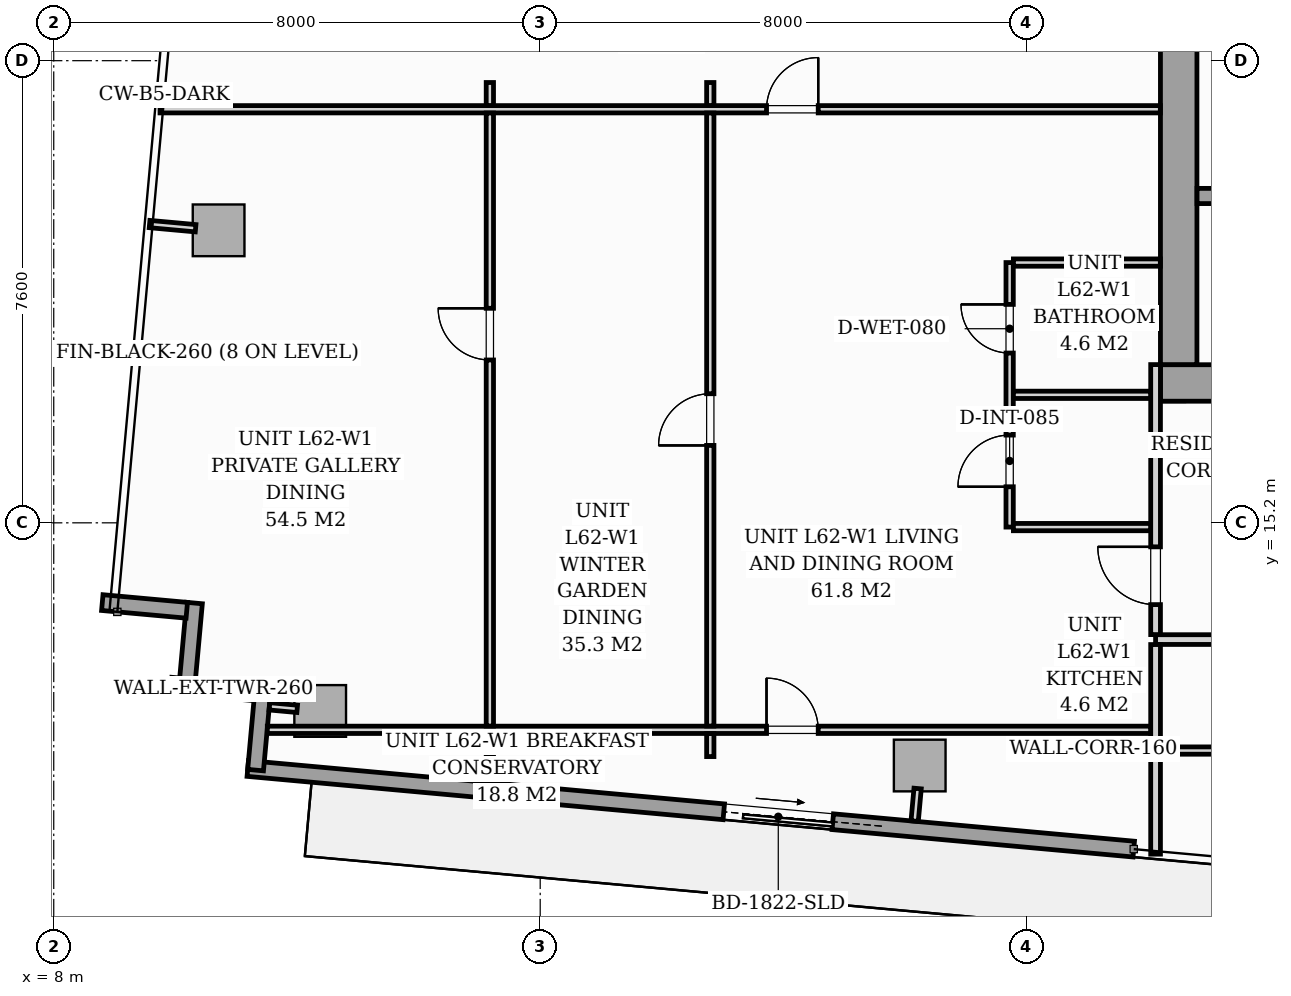
"""IFC4 building model, lengths in metres.
Left out: names, types, materials, properties, quantities, classifications, styles, units other than length and angle.
Written with IfcOpenShell. Run it as: python <this file> out.ifc"""

import sys

from ifc_helpers import new_model, si_unit, direction, frame, frame_2d, origin, origin_2d, place, context, subcontext, project, spatial, rectangle, i_section, extrude, source, transform, mapped, element, fill, save


model = new_model("IFC4")
c1 = context("Model", 3, precision=1e-05, world=origin(), true_north=direction((0.0, 1.0)))
c2 = subcontext(c1, "Body", "Model", "MODEL_VIEW")
j1 = project(units=[si_unit("LENGTHUNIT", "METRE"), si_unit("PLANEANGLEUNIT", "RADIAN")], contexts=[c1])
p1 = place(None, origin())
s1 = spatial("IfcSite", under=j1, at=p1, CompositionType="ELEMENT")
p2 = place(p1, origin())
s2 = spatial("IfcBuilding", under=s1, at=p2, CompositionType="ELEMENT")
p3 = place(p2, frame((0.0, 0.0, 216.6)))
s3 = spatial("IfcBuildingStorey", under=s2, at=p3, CompositionType="ELEMENT", Elevation=216.6)
m1 = source(origin(), c2, "Body", "SweptSolid", [
    extrude(i_section(OverallWidth=0.409, OverallDepth=0.425, WebThickness=0.033, FlangeThickness=0.052, FilletRadius=0.018, at=origin_2d()), origin(), (0.0, 0.0, 1.0), 3.296),
])
p4 = place(p3, frame((26.4, 17.4, 0.002), z_axis=(0.0, 0.0, 1.0), x_axis=(1.0, 0.0, 0.0)))
e1 = element("IfcColumn", 1, at=p4, inside=s3, PredefinedType="PILASTER", context=c2, shape_type="MappedRepresentation", body=[
    mapped(m1, transform((0.0, 0.0, 0.0), scale=1.0)),
])
m2 = source(origin(), c2, "Body", "SweptSolid", [
    extrude(rectangle(XDim=0.85, YDim=0.85, at=origin_2d()), origin(), (0.0, 0.0, 1.0), 3.294),
])
for number, where, z_axis, x_axis in (
    (2, (12.382, 12.106, 0.004), (0.0, 0.0, 1.0), (0.996, -0.091, 0.0)),
    (3, (22.241, 11.209, 0.004), (0.0, 0.0, 1.0), (0.996, -0.091, 0.0)),
    (4, (10.711, 20.01, 0.004), (0.0, 0.0, 1.0), (0.996, -0.091, 0.0)),
):
    element("IfcColumn", number, at=place(p3, frame(where, z_axis=z_axis, x_axis=x_axis)), inside=s3, PredefinedType="COLUMN", context=c2, shape_type="MappedRepresentation", body=[
        mapped(m2, transform((0.0, 0.0, 0.0), scale=1.0)),
    ])
p5 = place(p3, frame((11.319, 12.404, 0.0), z_axis=(0.0, 0.0, 1.0), x_axis=(-0.995881721538, 0.090661991521, 0.0)))
e5 = element("IfcWall", 5, at=p5, inside=s3, PredefinedType="STANDARD", context=c2, shape_type="SweptSolid", body=[
    extrude(rectangle(XDim=1.395, YDim=0.26, at=frame_2d((0.698, 0.0))), origin(), (0.0, 0.0, 1.0), 3.04),
])
p6 = place(p3, frame((10.188, 12.492, 0.0), z_axis=(0.0, 0.0, 1.0), x_axis=(0.090646191665, 0.995883159782, 0.0)))
e6 = element("IfcWall", 6, at=p6, inside=s3, PredefinedType="STANDARD", context=c2, shape_type="SweptSolid", body=[
    extrude(rectangle(XDim=1.395, YDim=0.26, at=frame_2d((0.698, 0.0))), origin(), (0.0, 0.0, 1.0), 3.04),
])
p7 = place(p3, frame((10.188, 13.762, 0.0), z_axis=(0.0, 0.0, 1.0), x_axis=(-0.995881721538, 0.090661991521, 0.0)))
e7 = element("IfcWall", 7, at=p7, inside=s3, PredefinedType="STANDARD", context=c2, shape_type="SweptSolid", body=[
    extrude(rectangle(XDim=1.395, YDim=0.26, at=frame_2d((0.698, 0.0))), origin(), (0.0, 0.0, 1.0), 3.04),
])
p8 = place(p3, frame((25.761, 9.834, 0.0), z_axis=(0.0, 0.0, 1.0), x_axis=(-0.995884584572, 0.090630536861, 0.0)))
e8 = element("IfcWall", 8, at=p8, inside=s3, PredefinedType="STANDARD", context=c2, shape_type="SweptSolid", body=[
    extrude(rectangle(XDim=14.63, YDim=0.26, at=frame_2d((7.315, 0.0))), origin(), (0.0, 0.0, 1.0), 3.04),
])
p9 = place(p8, frame((4.97, 0.0, 0.0)))
e9 = element("IfcOpeningElement", 9, at=p9, cuts=e8, PredefinedType="OPENING", context=c2, shape_type="SweptSolid", body=[
    extrude(rectangle(XDim=1.8, YDim=2.06, at=frame_2d((0.9, 1.03))), frame((0.0, 0.14, 0.0), z_axis=(0.0, -1.0, 0.0), x_axis=(1.0, 0.0, 0.0)), (0.0, 0.0, 1.0), 0.28),
])
p10 = place(p3, frame((11.319, 11.134, 0.0), z_axis=(0.0, 0.0, 1.0), x_axis=(0.090661991521, 0.995881721538, 0.0)))
e10 = element("IfcWall", 10, at=p10, inside=s3, PredefinedType="STANDARD", context=c2, shape_type="SweptSolid", body=[
    extrude(rectangle(XDim=1.395, YDim=0.26, at=frame_2d((0.698, 0.0))), origin(), (0.0, 0.0, 1.0), 3.04),
])
p11 = place(p3, frame((26.2, 17.5, 0.0), z_axis=(0.0, 0.0, 1.0), x_axis=(1.0, 0.0, 0.0)))
e11 = element("IfcWall", 11, at=p11, inside=s3, PredefinedType="SHEAR", context=c2, shape_type="SweptSolid", body=[
    extrude(rectangle(XDim=19.6, YDim=0.6, at=frame_2d((9.8, 0.0))), origin(), (0.0, 0.0, 1.0), 3.3),
])
p12 = place(p11, frame((0.95, 0.0, 0.0)))
e12 = element("IfcOpeningElement", 12, at=p12, cuts=e11, PredefinedType="OPENING", context=c2, shape_type="SweptSolid", body=[
    extrude(rectangle(XDim=0.95, YDim=2.06, at=frame_2d((0.475, 1.03))), frame((0.0, 0.31, 0.0), z_axis=(0.0, -1.0, 0.0), x_axis=(1.0, 0.0, 0.0)), (0.0, 0.0, 1.0), 0.62),
])
p13 = place(p11, frame((9.38, 0.0, 0.0)))
e13 = element("IfcOpeningElement", 13, at=p13, cuts=e11, PredefinedType="OPENING", context=c2, shape_type="SweptSolid", body=[
    extrude(rectangle(XDim=0.85, YDim=2.0, at=frame_2d((0.425, 1.0))), frame((0.0, 0.31, 0.0), z_axis=(0.0, -1.0, 0.0), x_axis=(1.0, 0.0, 0.0)), (0.0, 0.0, 1.0), 0.62),
])
p14 = place(p11, frame((17.55, 0.0, 0.0)))
e14 = element("IfcOpeningElement", 14, at=p14, cuts=e11, PredefinedType="OPENING", context=c2, shape_type="SweptSolid", body=[
    extrude(rectangle(XDim=0.95, YDim=2.06, at=frame_2d((0.475, 1.03))), frame((0.0, 0.31, 0.0), z_axis=(0.0, -1.0, 0.0), x_axis=(1.0, 0.0, 0.0)), (0.0, 0.0, 1.0), 0.62),
])
p15 = place(p3, frame((26.5, 17.802, 0.0), z_axis=(0.0, 0.0, 1.0), x_axis=(0.0, 1.0, 0.0)))
e15 = element("IfcWall", 15, at=p15, inside=s3, PredefinedType="SHEAR", context=c2, shape_type="SweptSolid", body=[
    extrude(rectangle(XDim=5.796, YDim=0.6, at=frame_2d((2.898, 0.0))), origin(), (0.0, 0.0, 1.0), 3.3),
])
p16 = place(p3, frame((26.802, 20.575, 0.0), z_axis=(0.0, 0.0, 1.0), x_axis=(1.0, 0.0, 0.0)))
e16 = element("IfcWall", 16, at=p16, inside=s3, PredefinedType="SOLIDWALL", context=c2, shape_type="SweptSolid", body=[
    extrude(rectangle(XDim=8.148, YDim=0.25, at=frame_2d((4.074, 0.0))), origin(), (0.0, 0.0, 1.0), 3.3),
])
p17 = place(p16, frame((0.298, 0.0, 0.0)))
e17 = element("IfcOpeningElement", 17, at=p17, cuts=e16, PredefinedType="OPENING", context=c2, shape_type="SweptSolid", body=[
    extrude(rectangle(XDim=0.95, YDim=2.06, at=frame_2d((0.475, 1.03))), frame((0.0, 0.135, 0.0), z_axis=(0.0, -1.0, 0.0), x_axis=(1.0, 0.0, 0.0)), (0.0, 0.0, 1.0), 0.27),
])
p18 = place(p3, frame((26.12, 13.28, 0.0), z_axis=(0.0, 0.0, 1.0), x_axis=(1.0, 0.0, 0.0)))
e18 = element("IfcWall", 18, at=p18, inside=s3, PredefinedType="PARTITIONING", context=c2, shape_type="SweptSolid", body=[
    extrude(rectangle(XDim=19.76, YDim=0.16, at=frame_2d((9.88, 0.0))), origin(), (0.0, 0.0, 1.0), 2.55),
])
p19 = place(p18, frame((5.345, 0.0, 0.0)))
e19 = element("IfcOpeningElement", 19, at=p19, cuts=e18, PredefinedType="OPENING", context=c2, shape_type="SweptSolid", body=[
    extrude(rectangle(XDim=0.95, YDim=2.06, at=frame_2d((0.475, 1.03))), frame((0.0, 0.09, 0.0), z_axis=(0.0, -1.0, 0.0), x_axis=(1.0, 0.0, 0.0)), (0.0, 0.0, 1.0), 0.18),
])
p20 = place(p18, frame((8.612, 0.0, 0.0)))
e20 = element("IfcOpeningElement", 20, at=p20, cuts=e18, PredefinedType="OPENING", context=c2, shape_type="SweptSolid", body=[
    extrude(rectangle(XDim=0.95, YDim=2.06, at=frame_2d((0.475, 1.03))), frame((0.0, 0.09, 0.0), z_axis=(0.0, -1.0, 0.0), x_axis=(1.0, 0.0, 0.0)), (0.0, 0.0, 1.0), 0.18),
])
p21 = place(p3, frame((26.12, 9.751, 0.0), z_axis=(0.0, 0.0, 1.0), x_axis=(0.0, 1.0, 0.0)))
e21 = element("IfcWall", 21, at=p21, inside=s3, PredefinedType="PARTITIONING", context=c2, shape_type="SweptSolid", body=[
    extrude(rectangle(XDim=3.447, YDim=0.16, at=frame_2d((1.723, 0.0))), origin(), (0.0, 0.0, 1.0), 3.04),
])
p22 = place(p3, frame((26.12, 13.362, 0.0), z_axis=(0.0, 0.0, 1.0), x_axis=(0.0, 1.0, 0.0)))
e22 = element("IfcWall", 22, at=p22, inside=s3, PredefinedType="PARTITIONING", context=c2, shape_type="SweptSolid", body=[
    extrude(rectangle(XDim=4.44, YDim=0.16, at=frame_2d((2.22, 0.0))), origin(), (0.0, 0.0, 1.0), 3.04),
])
p23 = place(p22, frame((0.493, 0.0, 0.0)))
e23 = element("IfcOpeningElement", 23, at=p23, cuts=e22, PredefinedType="OPENING", context=c2, shape_type="SweptSolid", body=[
    extrude(rectangle(XDim=0.95, YDim=2.06, at=frame_2d((0.475, 1.03))), frame((0.0, 0.09, 0.0), z_axis=(0.0, -1.0, 0.0), x_axis=(1.0, 0.0, 0.0)), (0.0, 0.0, 1.0), 0.18),
])
p24 = place(p3, frame((26.202, 11.455, 0.0), z_axis=(0.0, 0.0, 1.0), x_axis=(1.0, 0.0, 0.0)))
e24 = element("IfcWall", 24, at=p24, inside=s3, PredefinedType="PARTITIONING", context=c2, shape_type="SweptSolid", body=[
    extrude(rectangle(XDim=4.098, YDim=0.12, at=frame_2d((2.049, 0.0))), origin(), (0.0, 0.0, 1.0), 2.55),
])
p25 = place(p24, frame((1.14, 0.0, 0.0)))
e25 = element("IfcOpeningElement", 25, at=p25, cuts=e24, PredefinedType="OPENING", context=c2, shape_type="SweptSolid", body=[
    extrude(rectangle(XDim=0.55, YDim=2.0, at=frame_2d((0.275, 1.0))), frame((0.0, 0.07, 0.0), z_axis=(0.0, -1.0, 0.0), x_axis=(1.0, 0.0, 0.0)), (0.0, 0.0, 1.0), 0.14),
])
p26 = place(p24, frame((2.573, 0.0, 0.0)))
e26 = element("IfcOpeningElement", 26, at=p26, cuts=e24, PredefinedType="OPENING", context=c2, shape_type="SweptSolid", body=[
    extrude(rectangle(XDim=0.85, YDim=2.05, at=frame_2d((0.425, 1.025))), frame((0.0, 0.07, 0.0), z_axis=(0.0, -1.0, 0.0), x_axis=(1.0, 0.0, 0.0)), (0.0, 0.0, 1.0), 0.14),
])
p27 = place(p3, frame((23.72, 15.13, 0.0), z_axis=(0.0, 0.0, 1.0), x_axis=(0.0, 1.0, 0.0)))
e27 = element("IfcWall", 27, at=p27, inside=s3, PredefinedType="PARTITIONING", context=c2, shape_type="SweptSolid", body=[
    extrude(rectangle(XDim=4.35, YDim=0.12, at=frame_2d((2.175, 0.0))), origin(), (0.0, 0.0, 1.0), 3.04),
])
p28 = place(p27, frame((0.663, 0.0, 0.0)))
e28 = element("IfcOpeningElement", 28, at=p28, cuts=e27, PredefinedType="OPENING", context=c2, shape_type="SweptSolid", body=[
    extrude(rectangle(XDim=0.85, YDim=2.05, at=frame_2d((0.425, 1.025))), frame((0.0, 0.07, 0.0), z_axis=(0.0, -1.0, 0.0), x_axis=(1.0, 0.0, 0.0)), (0.0, 0.0, 1.0), 0.14),
])
p29 = place(p27, frame((2.862, 0.0, 0.0)))
e29 = element("IfcOpeningElement", 29, at=p29, cuts=e27, PredefinedType="OPENING", context=c2, shape_type="SweptSolid", body=[
    extrude(rectangle(XDim=0.8, YDim=2.02, at=frame_2d((0.4, 1.01))), frame((0.0, 0.07, 0.0), z_axis=(0.0, -1.0, 0.0), x_axis=(1.0, 0.0, 0.0)), (0.0, 0.0, 1.0), 0.14),
])
p30 = place(p3, frame((23.782, 17.305, 0.0), z_axis=(0.0, 0.0, 1.0), x_axis=(1.0, 0.0, 0.0)))
e30 = element("IfcWall", 30, at=p30, inside=s3, PredefinedType="PARTITIONING", context=c2, shape_type="SweptSolid", body=[
    extrude(rectangle(XDim=2.256, YDim=0.12, at=frame_2d((1.128, 0.0))), origin(), (0.0, 0.0, 1.0), 2.381),
])
p31 = place(p3, frame((23.782, 15.13, 0.0), z_axis=(0.0, 0.0, 1.0), x_axis=(1.0, 0.0, 0.0)))
e31 = element("IfcWall", 31, at=p31, inside=s3, PredefinedType="PARTITIONING", context=c2, shape_type="SweptSolid", body=[
    extrude(rectangle(XDim=2.256, YDim=0.12, at=frame_2d((1.128, 0.0))), origin(), (0.0, 0.0, 1.0), 3.04),
])
p32 = place(p3, frame((23.782, 19.48, 0.0), z_axis=(0.0, 0.0, 1.0), x_axis=(1.0, 0.0, 0.0)))
e32 = element("IfcWall", 32, at=p32, inside=s3, PredefinedType="PARTITIONING", context=c2, shape_type="SweptSolid", body=[
    extrude(rectangle(XDim=2.416, YDim=0.12, at=frame_2d((1.208, 0.0))), origin(), (0.0, 0.0, 1.0), 3.04),
])
p33 = place(p3, frame((9.748, 22.001, 0.0), z_axis=(0.0, 0.0, 1.0), x_axis=(1.0, 0.0, 0.0)))
e33 = element("IfcWall", 33, at=p33, inside=s3, PredefinedType="PARTITIONING", context=c2, shape_type="SweptSolid", body=[
    extrude(rectangle(XDim=16.45, YDim=0.12, at=frame_2d((8.225, 0.0))), origin(), (0.0, 0.0, 1.0), 3.04),
])
p34 = place(p33, frame((9.974, 0.0, 0.0)))
e34 = element("IfcOpeningElement", 34, at=p34, cuts=e33, PredefinedType="OPENING", context=c2, shape_type="SweptSolid", body=[
    extrude(rectangle(XDim=0.85, YDim=2.05, at=frame_2d((0.425, 1.025))), frame((0.0, 0.07, 0.0), z_axis=(0.0, -1.0, 0.0), x_axis=(1.0, 0.0, 0.0)), (0.0, 0.0, 1.0), 0.14),
])
p35 = place(p3, frame((11.512, 11.796, 0.0), z_axis=(0.0, 0.0, 1.0), x_axis=(1.0, 0.0, 0.0)))
e35 = element("IfcWall", 35, at=p35, inside=s3, PredefinedType="PARTITIONING", context=c2, shape_type="SweptSolid", body=[
    extrude(rectangle(XDim=14.526, YDim=0.12, at=frame_2d((7.263, 0.0))), origin(), (0.0, 0.0, 1.0), 2.482),
])
p36 = place(p35, frame((8.21, 0.0, 0.0)))
e36 = element("IfcOpeningElement", 36, at=p36, cuts=e35, PredefinedType="OPENING", context=c2, shape_type="SweptSolid", body=[
    extrude(rectangle(XDim=0.85, YDim=2.05, at=frame_2d((0.425, 1.025))), frame((0.0, 0.07, 0.0), z_axis=(0.0, -1.0, 0.0), x_axis=(1.0, 0.0, 0.0)), (0.0, 0.0, 1.0), 0.14),
])
p37 = place(p3, frame((15.172, 11.356, 0.0), z_axis=(0.0, 0.0, 1.0), x_axis=(0.0, 1.0, 0.0)))
e37 = element("IfcWall", 37, at=p37, inside=s3, PredefinedType="PARTITIONING", context=c2, shape_type="SweptSolid", body=[
    extrude(rectangle(XDim=0.378, YDim=0.12, at=frame_2d((0.189, 0.0))), origin(), (0.0, 0.0, 1.0), 3.04),
])
p38 = place(p3, frame((15.172, 11.858, 0.0), z_axis=(0.0, 0.0, 1.0), x_axis=(0.0, 1.0, 0.0)))
e38 = element("IfcWall", 38, at=p38, inside=s3, PredefinedType="PARTITIONING", context=c2, shape_type="SweptSolid", body=[
    extrude(rectangle(XDim=10.081, YDim=0.12, at=frame_2d((5.041, 0.0))), origin(), (0.0, 0.0, 1.0), 3.04),
])
p39 = place(p38, frame((6.02, 0.0, 0.0)))
e39 = element("IfcOpeningElement", 39, at=p39, cuts=e38, PredefinedType="OPENING", context=c2, shape_type="SweptSolid", body=[
    extrude(rectangle(XDim=0.85, YDim=2.05, at=frame_2d((0.425, 1.025))), frame((0.0, 0.07, 0.0), z_axis=(0.0, -1.0, 0.0), x_axis=(1.0, 0.0, 0.0)), (0.0, 0.0, 1.0), 0.14),
])
for number, where, z_axis, x_axis in (
    (40, (15.172, 22.063, 0.0), (0.0, 0.0, 1.0), (0.0, 1.0, 0.0)),
    (41, (18.797, 11.356, 0.0), (0.0, 0.0, 1.0), (0.0, 1.0, 0.0)),
):
    element("IfcWall", number, at=place(p3, frame(where, z_axis=z_axis, x_axis=x_axis)), inside=s3, PredefinedType="PARTITIONING", context=c2, shape_type="SweptSolid", body=[
        extrude(rectangle(XDim=0.378, YDim=0.12, at=frame_2d((0.189, 0.0))), origin(), (0.0, 0.0, 1.0), 3.04),
    ])
p40 = place(p3, frame((18.797, 11.858, 0.0), z_axis=(0.0, 0.0, 1.0), x_axis=(0.0, 1.0, 0.0)))
e42 = element("IfcWall", 42, at=p40, inside=s3, PredefinedType="PARTITIONING", context=c2, shape_type="SweptSolid", body=[
    extrude(rectangle(XDim=10.081, YDim=0.12, at=frame_2d((5.041, 0.0))), origin(), (0.0, 0.0, 1.0), 3.04),
])
p41 = place(p40, frame((4.615, 0.0, 0.0)))
e43 = element("IfcOpeningElement", 43, at=p41, cuts=e42, PredefinedType="OPENING", context=c2, shape_type="SweptSolid", body=[
    extrude(rectangle(XDim=0.85, YDim=2.05, at=frame_2d((0.425, 1.025))), frame((0.0, 0.07, 0.0), z_axis=(0.0, -1.0, 0.0), x_axis=(1.0, 0.0, 0.0)), (0.0, 0.0, 1.0), 0.14),
])
p42 = place(p3, frame((18.797, 22.063, 0.0), z_axis=(0.0, 0.0, 1.0), x_axis=(0.0, 1.0, 0.0)))
e44 = element("IfcWall", 44, at=p42, inside=s3, PredefinedType="PARTITIONING", context=c2, shape_type="SweptSolid", body=[
    extrude(rectangle(XDim=0.378, YDim=0.12, at=frame_2d((0.189, 0.0))), origin(), (0.0, 0.0, 1.0), 3.04),
])
p43 = place(p3, frame((12.003, 12.141, 0.0), z_axis=(0.0, 0.0, 1.0), x_axis=(-0.995884462012, 0.090631883588, 0.0)))
e45 = element("IfcWall", 45, at=p43, inside=s3, PredefinedType="PARTITIONING", context=c2, shape_type="SweptSolid", body=[
    extrude(rectangle(XDim=0.458, YDim=0.12, at=frame_2d((0.229, 0.0))), origin(), (0.0, 0.0, 1.0), 3.04),
])
p44 = place(p3, frame((22.207, 10.831, 0.0), z_axis=(0.0, 0.0, 1.0), x_axis=(-0.090781299264, -0.995870852924, 0.0)))
e46 = element("IfcWall", 46, at=p44, inside=s3, PredefinedType="PARTITIONING", context=c2, shape_type="SweptSolid", body=[
    extrude(rectangle(XDim=0.538, YDim=0.12, at=frame_2d((0.269, 0.0))), origin(), (0.0, 0.0, 1.0), 3.04),
])
p45 = place(p3, frame((10.333, 20.045, 0.0), z_axis=(0.0, 0.0, 1.0), x_axis=(-0.995890573658, 0.09056470228, 0.0)))
e47 = element("IfcWall", 47, at=p45, inside=s3, PredefinedType="PARTITIONING", context=c2, shape_type="SweptSolid", body=[
    extrude(rectangle(XDim=0.76, YDim=0.12, at=frame_2d((0.38, 0.0))), origin(), (0.0, 0.0, 1.0), 3.04),
])
m3 = source(origin(), c2, "Body", "SweptSolid", [
    extrude(rectangle(XDim=1.8, YDim=2.06, at=frame_2d((0.9, 1.03))), frame((0.0, 0.025, 0.0), z_axis=(0.0, -1.0, 0.0), x_axis=(1.0, 0.0, 0.0)), (0.0, 0.0, 1.0), 0.05),
])
p46 = place(p9, origin())
e48 = element("IfcDoor", 48, at=p46, inside=s3, OperationType="SLIDING_TO_LEFT", PredefinedType="DOOR", context=c2, shape_type="MappedRepresentation", body=[
    mapped(m3, transform((0.0, 0.0, 0.0), scale=1.0)),
])
fill(e9, e48)
m4 = source(origin(), c2, "Body", "SweptSolid", [
    extrude(rectangle(XDim=0.95, YDim=2.06, at=frame_2d((0.475, 1.03))), frame((0.0, 0.025, 0.0), z_axis=(0.0, -1.0, 0.0), x_axis=(1.0, 0.0, 0.0)), (0.0, 0.0, 1.0), 0.05),
])
p47 = place(p23, origin())
e49 = element("IfcDoor", 49, at=p47, inside=s3, OperationType="SINGLE_SWING_RIGHT", PredefinedType="DOOR", context=c2, shape_type="MappedRepresentation", body=[
    mapped(m4, transform((0.0, 0.0, 0.0), scale=1.0)),
])
fill(e23, e49)
m5 = source(origin(), c2, "Body", "SweptSolid", [
    extrude(rectangle(XDim=0.85, YDim=2.05, at=frame_2d((0.425, 1.025))), frame((0.0, 0.025, 0.0), z_axis=(0.0, -1.0, 0.0), x_axis=(1.0, 0.0, 0.0)), (0.0, 0.0, 1.0), 0.05),
])
p48 = place(p28, origin())
e50 = element("IfcDoor", 50, at=p48, inside=s3, OperationType="SINGLE_SWING_LEFT", PredefinedType="DOOR", context=c2, shape_type="MappedRepresentation", body=[
    mapped(m5, transform((0.0, 0.0, 0.0), scale=1.0)),
])
fill(e28, e50)
m6 = source(origin(), c2, "Body", "SweptSolid", [
    extrude(rectangle(XDim=0.8, YDim=2.02, at=frame_2d((0.4, 1.01))), frame((0.0, 0.025, 0.0), z_axis=(0.0, -1.0, 0.0), x_axis=(1.0, 0.0, 0.0)), (0.0, 0.0, 1.0), 0.05),
])
p49 = place(p29, origin())
e51 = element("IfcDoor", 51, at=p49, inside=s3, OperationType="SINGLE_SWING_RIGHT", PredefinedType="DOOR", context=c2, shape_type="MappedRepresentation", body=[
    mapped(m6, transform((0.0, 0.0, 0.0), scale=1.0)),
])
fill(e29, e51)
p50 = place(p34, origin())
e52 = element("IfcDoor", 52, at=p50, inside=s3, OperationType="SINGLE_SWING_RIGHT", PredefinedType="DOOR", context=c2, shape_type="MappedRepresentation", body=[
    mapped(m5, transform((0.0, 0.0, 0.0), scale=1.0)),
])
fill(e34, e52)
p51 = place(p36, origin())
e53 = element("IfcDoor", 53, at=p51, inside=s3, OperationType="SINGLE_SWING_LEFT", PredefinedType="DOOR", context=c2, shape_type="MappedRepresentation", body=[
    mapped(m5, transform((0.0, 0.0, 0.0), scale=1.0)),
])
fill(e36, e53)
p52 = place(p39, origin())
e54 = element("IfcDoor", 54, at=p52, inside=s3, OperationType="SINGLE_SWING_RIGHT", PredefinedType="DOOR", context=c2, shape_type="MappedRepresentation", body=[
    mapped(m5, transform((0.0, 0.0, 0.0), scale=1.0)),
])
fill(e39, e54)
p53 = place(p41, origin())
e55 = element("IfcDoor", 55, at=p53, inside=s3, OperationType="SINGLE_SWING_LEFT", PredefinedType="DOOR", context=c2, shape_type="MappedRepresentation", body=[
    mapped(m5, transform((0.0, 0.0, 0.0), scale=1.0)),
])
fill(e43, e55)
save(model, sys.argv[1])
